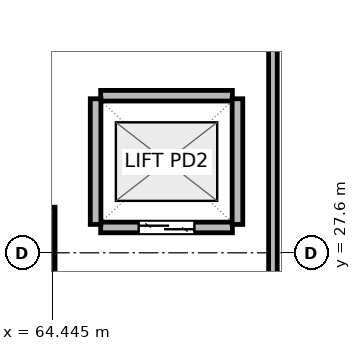
"""IFC4 building model, lengths in metres.
Left out: names, types, materials, properties, quantities, classifications, styles, units other than length and angle.
Written with IfcOpenShell. Run it as: python <this file> out.ifc"""

import sys

from ifc_helpers import new_model, si_unit, direction, frame, frame_2d, origin, origin_2d, place, context, subcontext, project, spatial, rectangle, extrude, element, fill, save


model = new_model("IFC4")
c1 = context("Model", 3, precision=1e-05, world=origin(), true_north=direction((0.0, 1.0)))
c2 = subcontext(c1, "Body", "Model", "MODEL_VIEW")
j1 = project(units=[si_unit("LENGTHUNIT", "METRE"), si_unit("PLANEANGLEUNIT", "RADIAN")], contexts=[c1])
p1 = place(None, origin())
s1 = spatial("IfcSite", under=j1, at=p1, CompositionType="ELEMENT")
p2 = place(p1, origin())
s2 = spatial("IfcBuilding", under=s1, at=p2, CompositionType="ELEMENT")
p3 = place(p2, frame((0.0, 0.0, 4.5)))
s3 = spatial("IfcBuildingStorey", under=s2, at=p3, CompositionType="ELEMENT", Elevation=4.5)
p4 = place(p3, frame((63.6, 27.6, 0.0), z_axis=(0.0, 0.0, 1.0), x_axis=(1.0, 0.0, 0.0)))
e1 = element("IfcColumn", 1, at=p4, inside=s3, PredefinedType="COLUMN", context=c2, shape_type="SweptSolid", body=[
    extrude(rectangle(XDim=1.8, YDim=1.8, at=origin_2d()), origin(), (0.0, 0.0, 1.0), 4.2),
])
p5 = place(p3, frame((65.4, 28.1, 0.0), z_axis=(0.0, 0.0, 1.0), x_axis=(1.0, 0.0, 0.0)))
e2 = element("IfcWall", 2, at=p5, inside=s3, PredefinedType="PARTITIONING", context=c2, shape_type="SweptSolid", body=[
    extrude(rectangle(XDim=2.6, YDim=0.21, at=frame_2d((1.3, 0.0))), origin(), (0.0, 0.0, 1.0), 3.88),
])
p6 = place(p5, frame((0.75, 0.0, 0.0)))
e3 = element("IfcOpeningElement", 3, at=p6, cuts=e2, PredefinedType="OPENING", context=c2, shape_type="SweptSolid", body=[
    extrude(rectangle(XDim=1.1, YDim=2.04, at=frame_2d((0.55, 1.02))), frame((0.0, 0.115, 0.0), z_axis=(0.0, -1.0, 0.0), x_axis=(1.0, 0.0, 0.0)), (0.0, 0.0, 1.0), 0.23),
])
p7 = place(p3, frame((65.4, 30.7, 0.0), z_axis=(0.0, 0.0, 1.0), x_axis=(1.0, 0.0, 0.0)))
e4 = element("IfcWall", 4, at=p7, inside=s3, PredefinedType="PARTITIONING", context=c2, shape_type="SweptSolid", body=[
    extrude(rectangle(XDim=2.6, YDim=0.21, at=frame_2d((1.3, 0.0))), origin(), (0.0, 0.0, 1.0), 3.88),
])
for number, where, z_axis, x_axis in (
    (5, (65.3, 28.16, 0.0), (0.0, 0.0, 1.0), (0.0, 1.0, 0.0)),
    (6, (68.1, 28.16, 0.0), (0.0, 0.0, 1.0), (0.0, 1.0, 0.0)),
):
    element("IfcWall", number, at=place(p3, frame(where, z_axis=z_axis, x_axis=x_axis)), inside=s3, PredefinedType="PARTITIONING", context=c2, shape_type="SweptSolid", body=[
        extrude(rectangle(XDim=2.48, YDim=0.21, at=frame_2d((1.24, 0.0))), origin(), (0.0, 0.0, 1.0), 3.88),
    ])
p8 = place(p3, frame((68.8, 25.187, 0.0), z_axis=(0.0, 0.0, 1.0), x_axis=(0.0, 1.0, 0.0)))
e7 = element("IfcWall", 7, at=p8, inside=s3, PredefinedType="PARTITIONING", context=c2, shape_type="SweptSolid", body=[
    extrude(rectangle(XDim=46.448, YDim=0.17, at=frame_2d((23.224, 0.0))), origin(), (0.0, 0.0, 1.0), 3.88),
])
p9 = place(p8, frame((15.913, 0.0, 0.0)))
e8 = element("IfcOpeningElement", 8, at=p9, cuts=e7, PredefinedType="OPENING", context=c2, shape_type="SweptSolid", body=[
    extrude(rectangle(XDim=1.1, YDim=2.05, at=frame_2d((0.55, 1.025))), frame((0.0, 0.095, 0.0), z_axis=(0.0, -1.0, 0.0), x_axis=(1.0, 0.0, 0.0)), (0.0, 0.0, 1.0), 0.19),
])
p10 = place(p6, origin())
e9 = element("IfcDoor", 9, at=p10, inside=s3, OperationType="DOUBLE_DOOR_SLIDING", PredefinedType="DOOR", context=c2, shape_type="SweptSolid", body=[
    extrude(rectangle(XDim=1.1, YDim=2.04, at=frame_2d((0.55, 1.02))), frame((0.0, 0.025, 0.0), z_axis=(0.0, -1.0, 0.0), x_axis=(1.0, 0.0, 0.0)), (0.0, 0.0, 1.0), 0.05),
])
fill(e3, e9)
save(model, sys.argv[1])
